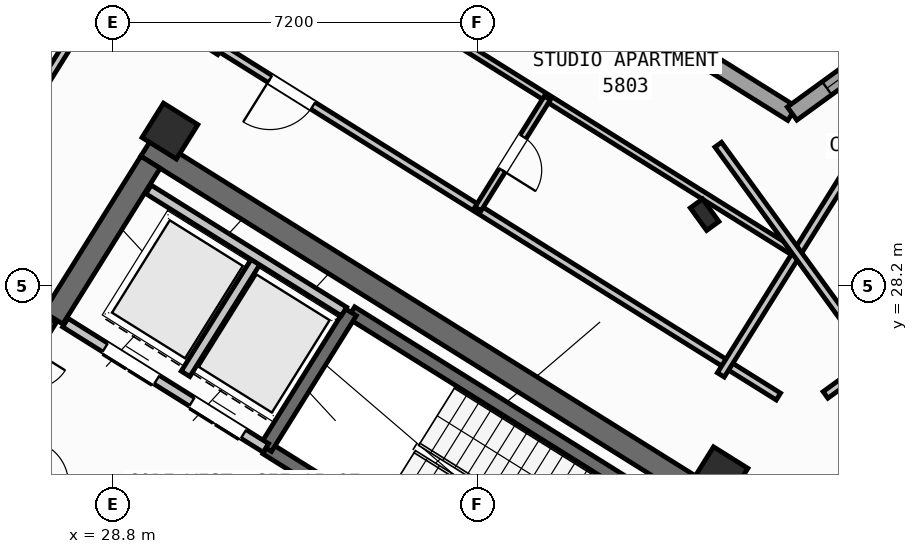
"""IFC4 building model, lengths in metres.
Left out: names, types, materials, properties, quantities, classifications, styles, units other than length and angle.
Written with IfcOpenShell. Run it as: python <this file> out.ifc"""

import sys

from ifc_helpers import new_model, si_unit, direction, frame, frame_2d, origin, origin_2d, place, context, subcontext, project, spatial, rectangle, hollow_rectangle, i_section, extrude, source, transform, mapped, element, fill, save


model = new_model("IFC4")
c1 = context("Model", 3, precision=1e-05, world=origin(), true_north=direction((0.0, 1.0)))
c2 = subcontext(c1, "Body", "Model", "MODEL_VIEW")
j1 = project(units=[si_unit("LENGTHUNIT", "METRE"), si_unit("PLANEANGLEUNIT", "RADIAN")], contexts=[c1])
p1 = place(None, origin())
s1 = spatial("IfcSite", under=j1, at=p1, CompositionType="ELEMENT")
p2 = place(p1, origin())
s2 = spatial("IfcBuilding", under=s1, at=p2, CompositionType="ELEMENT")
p3 = place(p2, frame((0.0, 0.0, 229.2)))
s3 = spatial("IfcBuildingStorey", under=s2, at=p3, CompositionType="ELEMENT", Elevation=229.2)
p4 = place(p3, frame((40.531, 24.036, 0.0), z_axis=(0.0, 0.0, 1.0), x_axis=(-0.848048787466, 0.529918157905, 0.0)))
e1 = element("IfcWall", 1, at=p4, inside=s3, PredefinedType="SHEAR", context=c2, shape_type="SweptSolid", body=[
    extrude(rectangle(XDim=13.04, YDim=0.45, at=frame_2d((6.52, 0.0))), origin(), (0.0, 0.0, 1.0), 4.22),
])
p5 = place(p3, frame((29.544, 30.636, 0.0), z_axis=(0.0, 0.0, 1.0), x_axis=(-0.529902075036, -0.848058836916, 0.0)))
e2 = element("IfcWall", 2, at=p5, inside=s3, PredefinedType="SHEAR", context=c2, shape_type="SweptSolid", body=[
    extrude(rectangle(XDim=3.625, YDim=0.45, at=frame_2d((1.812, 0.0))), origin(), (0.0, 0.0, 1.0), 4.22),
])
m1 = source(origin(), c2, "Body", "SweptSolid", [
    extrude(hollow_rectangle(XDim=0.8, YDim=0.8, WallThickness=0.032, at=origin_2d()), origin(), (0.0, 0.0, 1.0), 4.5),
])
for number, where, z_axis, x_axis in (
    (3, (40.783, 24.469, 0.0), (0.0, 0.0, 1.0), (-0.848, 0.53, 0.0)),
    (4, (29.928, 31.251, 0.0), (0.0, 0.0, 1.0), (-0.848, 0.53, 0.0)),
):
    element("IfcColumn", number, at=place(p3, frame(where, z_axis=z_axis, x_axis=x_axis)), inside=s3, PredefinedType="COLUMN", context=c2, shape_type="MappedRepresentation", body=[
        mapped(m1, transform((0.0, 0.0, 0.0), scale=1.0)),
    ])
m2 = source(origin(), c2, "Body", "SweptSolid", [
    extrude(i_section(OverallWidth=0.3, OverallDepth=0.55, WebThickness=0.015, FlangeThickness=0.029, at=origin_2d()), origin(), (0.0, 0.0, 1.0), 4.5),
])
p6 = place(p3, frame((40.479, 29.601, 0.0), z_axis=(0.0, 0.0, 1.0), x_axis=(0.809016994375, 0.587785252292, 0.0)))
e5 = element("IfcColumn", 5, at=p6, inside=s3, PredefinedType="COLUMN", context=c2, shape_type="MappedRepresentation", body=[
    mapped(m2, transform((0.0, 0.0, 0.0), scale=1.0)),
])
p7 = place(p3, frame((31.76, 12.183, 0.0), z_axis=(0.0, 0.0, 1.0), x_axis=(-0.848047074256, 0.529920899612, 0.0)))
e6 = element("IfcWall", 6, at=p7, inside=s3, PredefinedType="STANDARD", context=c2, shape_type="SweptSolid", body=[
    extrude(rectangle(XDim=30.652, YDim=0.32, at=frame_2d((15.326, 0.0))), origin(), (0.0, 0.0, 1.0), 4.22),
])
p8 = place(p7, frame((14.966, 0.0, 0.0)))
e7 = element("IfcOpeningElement", 7, at=p8, cuts=e6, PredefinedType="OPENING", context=c2, shape_type="SweptSolid", body=[
    extrude(rectangle(XDim=1.2, YDim=2.15, at=frame_2d((0.6, 1.075))), frame((0.0, 0.17, 0.0), z_axis=(0.0, -1.0, 0.0), x_axis=(1.0, 0.0, 0.0)), (0.0, 0.0, 1.0), 0.34),
])
p9 = place(p7, frame((2.096, 0.0, 0.9)))
e8 = element("IfcOpeningElement", 8, at=p9, cuts=e6, PredefinedType="OPENING", context=c2, shape_type="SweptSolid", body=[
    extrude(rectangle(XDim=1.65, YDim=1.45, at=frame_2d((0.825, 0.725))), frame((0.0, 0.17, 0.0), z_axis=(0.0, -1.0, 0.0), x_axis=(1.0, 0.0, 0.0)), (0.0, 0.0, 1.0), 0.34),
])
p10 = place(p7, frame((6.771, 0.0, 0.9)))
e9 = element("IfcOpeningElement", 9, at=p10, cuts=e6, PredefinedType="OPENING", context=c2, shape_type="SweptSolid", body=[
    extrude(rectangle(XDim=1.65, YDim=1.45, at=frame_2d((0.825, 0.725))), frame((0.0, 0.17, 0.0), z_axis=(0.0, -1.0, 0.0), x_axis=(1.0, 0.0, 0.0)), (0.0, 0.0, 1.0), 0.34),
])
p11 = place(p7, frame((20.283, 0.0, 0.95)))
e10 = element("IfcOpeningElement", 10, at=p11, cuts=e6, PredefinedType="OPENING", context=c2, shape_type="SweptSolid", body=[
    extrude(rectangle(XDim=1.95, YDim=1.35, at=frame_2d((0.975, 0.675))), frame((0.0, 0.17, 0.0), z_axis=(0.0, -1.0, 0.0), x_axis=(1.0, 0.0, 0.0)), (0.0, 0.0, 1.0), 0.34),
])
p12 = place(p7, frame((27.208, 0.0, 1.0)))
e11 = element("IfcOpeningElement", 11, at=p12, cuts=e6, PredefinedType="OPENING", context=c2, shape_type="SweptSolid", body=[
    extrude(rectangle(XDim=0.9, YDim=1.25, at=frame_2d((0.45, 0.625))), frame((0.0, 0.17, 0.0), z_axis=(0.0, -1.0, 0.0), x_axis=(1.0, 0.0, 0.0)), (0.0, 0.0, 1.0), 0.34),
])
p13 = place(p3, frame((17.424, 47.083, 0.0), z_axis=(0.0, 0.0, 1.0), x_axis=(0.848049927979, -0.529916332693, 0.0)))
e12 = element("IfcWall", 12, at=p13, inside=s3, PredefinedType="STANDARD", context=c2, shape_type="SweptSolid", body=[
    extrude(rectangle(XDim=29.223, YDim=0.32, at=frame_2d((14.612, 0.0))), origin(), (0.0, 0.0, 1.0), 4.22),
])
p14 = place(p13, frame((3.709, 0.0, 0.0)))
e13 = element("IfcOpeningElement", 13, at=p14, cuts=e12, PredefinedType="OPENING", context=c2, shape_type="SweptSolid", body=[
    extrude(rectangle(XDim=1.05, YDim=2.15, at=frame_2d((0.525, 1.075))), frame((0.0, 0.17, 0.0), z_axis=(0.0, -1.0, 0.0), x_axis=(1.0, 0.0, 0.0)), (0.0, 0.0, 1.0), 0.34),
])
p15 = place(p13, frame((0.809, 0.0, 1.0)))
e14 = element("IfcOpeningElement", 14, at=p15, cuts=e12, PredefinedType="OPENING", context=c2, shape_type="SweptSolid", body=[
    extrude(rectangle(XDim=0.9, YDim=1.25, at=frame_2d((0.45, 0.625))), frame((0.0, 0.17, 0.0), z_axis=(0.0, -1.0, 0.0), x_axis=(1.0, 0.0, 0.0)), (0.0, 0.0, 1.0), 0.34),
])
p16 = place(p13, frame((13.811, 0.0, 0.9)))
e15 = element("IfcOpeningElement", 15, at=p16, cuts=e12, PredefinedType="OPENING", context=c2, shape_type="SweptSolid", body=[
    extrude(rectangle(XDim=1.35, YDim=1.45, at=frame_2d((0.675, 0.725))), frame((0.0, 0.17, 0.0), z_axis=(0.0, -1.0, 0.0), x_axis=(1.0, 0.0, 0.0)), (0.0, 0.0, 1.0), 0.34),
])
p17 = place(p13, frame((17.254, 0.0, 1.0)))
e16 = element("IfcOpeningElement", 16, at=p17, cuts=e12, PredefinedType="OPENING", context=c2, shape_type="SweptSolid", body=[
    extrude(rectangle(XDim=0.9, YDim=1.25, at=frame_2d((0.45, 0.625))), frame((0.0, 0.17, 0.0), z_axis=(0.0, -1.0, 0.0), x_axis=(1.0, 0.0, 0.0)), (0.0, 0.0, 1.0), 0.34),
])
p18 = place(p13, frame((21.364, 0.0, 1.0)))
e17 = element("IfcOpeningElement", 17, at=p18, cuts=e12, PredefinedType="OPENING", context=c2, shape_type="SweptSolid", body=[
    extrude(rectangle(XDim=0.9, YDim=1.25, at=frame_2d((0.45, 0.625))), frame((0.0, 0.17, 0.0), z_axis=(0.0, -1.0, 0.0), x_axis=(1.0, 0.0, 0.0)), (0.0, 0.0, 1.0), 0.34),
])
p19 = place(p13, frame((26.003, 0.0, 1.0)))
e18 = element("IfcOpeningElement", 18, at=p19, cuts=e12, PredefinedType="OPENING", context=c2, shape_type="SweptSolid", body=[
    extrude(rectangle(XDim=0.9, YDim=1.25, at=frame_2d((0.45, 0.625))), frame((0.0, 0.17, 0.0), z_axis=(0.0, -1.0, 0.0), x_axis=(1.0, 0.0, 0.0)), (0.0, 0.0, 1.0), 0.34),
])
p20 = place(p13, frame((11.211, 0.0, 1.0)))
e19 = element("IfcOpeningElement", 19, at=p20, cuts=e12, PredefinedType="OPENING", context=c2, shape_type="SweptSolid", body=[
    extrude(rectangle(XDim=0.65, YDim=1.15, at=frame_2d((0.325, 0.575))), frame((0.0, 0.17, 0.0), z_axis=(0.0, -1.0, 0.0), x_axis=(1.0, 0.0, 0.0)), (0.0, 0.0, 1.0), 0.34),
])
p21 = place(p13, frame((9.079, 0.0, 1.0)))
e20 = element("IfcOpeningElement", 20, at=p21, cuts=e12, PredefinedType="OPENING", context=c2, shape_type="SweptSolid", body=[
    extrude(rectangle(XDim=0.65, YDim=1.15, at=frame_2d((0.325, 0.575))), frame((0.0, 0.17, 0.0), z_axis=(0.0, -1.0, 0.0), x_axis=(1.0, 0.0, 0.0)), (0.0, 0.0, 1.0), 0.34),
])
p22 = place(p13, frame((6.951, 0.0, 1.0)))
e21 = element("IfcOpeningElement", 21, at=p22, cuts=e12, PredefinedType="OPENING", context=c2, shape_type="SweptSolid", body=[
    extrude(rectangle(XDim=0.65, YDim=1.15, at=frame_2d((0.325, 0.575))), frame((0.0, 0.17, 0.0), z_axis=(0.0, -1.0, 0.0), x_axis=(1.0, 0.0, 0.0)), (0.0, 0.0, 1.0), 0.34),
])
p23 = place(p3, frame((42.207, 31.597, 0.0), z_axis=(0.0, 0.0, 1.0), x_axis=(0.809020333377, 0.587780656523, 0.0)))
e22 = element("IfcWall", 22, at=p23, inside=s3, PredefinedType="STANDARD", context=c2, shape_type="SweptSolid", body=[
    extrude(rectangle(XDim=15.223, YDim=0.32, at=frame_2d((7.611, 0.0))), origin(), (0.0, 0.0, 1.0), 4.22),
])
p24 = place(p23, frame((12.82, 0.0, 0.0)))
e23 = element("IfcOpeningElement", 23, at=p24, cuts=e22, PredefinedType="OPENING", context=c2, shape_type="SweptSolid", body=[
    extrude(rectangle(XDim=1.05, YDim=2.15, at=frame_2d((0.525, 1.075))), frame((0.0, 0.17, 0.0), z_axis=(0.0, -1.0, 0.0), x_axis=(1.0, 0.0, 0.0)), (0.0, 0.0, 1.0), 0.34),
])
p25 = place(p23, frame((0.85, 0.0, 0.9)))
e24 = element("IfcOpeningElement", 24, at=p25, cuts=e22, PredefinedType="OPENING", context=c2, shape_type="SweptSolid", body=[
    extrude(rectangle(XDim=1.65, YDim=1.45, at=frame_2d((0.825, 0.725))), frame((0.0, 0.17, 0.0), z_axis=(0.0, -1.0, 0.0), x_axis=(1.0, 0.0, 0.0)), (0.0, 0.0, 1.0), 0.34),
])
p26 = place(p23, frame((5.769, 0.0, 0.9)))
e25 = element("IfcOpeningElement", 25, at=p26, cuts=e22, PredefinedType="OPENING", context=c2, shape_type="SweptSolid", body=[
    extrude(rectangle(XDim=1.35, YDim=1.45, at=frame_2d((0.675, 0.725))), frame((0.0, 0.17, 0.0), z_axis=(0.0, -1.0, 0.0), x_axis=(1.0, 0.0, 0.0)), (0.0, 0.0, 1.0), 0.34),
])
p27 = place(p23, frame((10.219, 0.0, 1.0)))
e26 = element("IfcOpeningElement", 26, at=p27, cuts=e22, PredefinedType="OPENING", context=c2, shape_type="SweptSolid", body=[
    extrude(rectangle(XDim=0.9, YDim=1.25, at=frame_2d((0.45, 0.625))), frame((0.0, 0.17, 0.0), z_axis=(0.0, -1.0, 0.0), x_axis=(1.0, 0.0, 0.0)), (0.0, 0.0, 1.0), 0.34),
])
p28 = place(p3, frame((39.721, 23.788, 0.0), z_axis=(0.0, 0.0, 1.0), x_axis=(-0.848054434086, 0.529909121291, 0.0)))
e27 = element("IfcWall", 27, at=p28, inside=s3, PredefinedType="SHEAR", context=c2, shape_type="SweptSolid", body=[
    extrude(rectangle(XDim=7.33, YDim=0.26, at=frame_2d((3.665, 0.0))), origin(), (0.0, 0.0, 1.0), 4.22),
])
p29 = place(p3, frame((38.046, 21.108, 0.0), z_axis=(0.0, 0.0, 1.0), x_axis=(-0.848054434086, 0.529909121291, 0.0)))
e28 = element("IfcWall", 28, at=p29, inside=s3, PredefinedType="SHEAR", context=c2, shape_type="SweptSolid", body=[
    extrude(rectangle(XDim=7.33, YDim=0.26, at=frame_2d((3.665, 0.0))), origin(), (0.0, 0.0, 1.0), 4.22),
])
p30 = place(p29, frame((0.22, 0.0, 0.0)))
e29 = element("IfcOpeningElement", 29, at=p30, cuts=e28, PredefinedType="OPENING", context=c2, shape_type="SweptSolid", body=[
    extrude(rectangle(XDim=1.1, YDim=2.1, at=frame_2d((0.55, 1.05))), frame((0.0, 0.14, 0.0), z_axis=(0.0, -1.0, 0.0), x_axis=(1.0, 0.0, 0.0)), (0.0, 0.0, 1.0), 0.28),
])
p31 = place(p3, frame((33.496, 27.677, 0.0), z_axis=(0.0, 0.0, 1.0), x_axis=(-0.529908658664, -0.84805472316, 0.0)))
e30 = element("IfcWall", 30, at=p31, inside=s3, PredefinedType="SHEAR", context=c2, shape_type="SweptSolid", body=[
    extrude(rectangle(XDim=3.16, YDim=0.26, at=frame_2d((1.58, 0.0))), origin(), (0.0, 0.0, 1.0), 4.22),
])
p32 = place(p3, frame((31.822, 24.998, 0.0), z_axis=(0.0, 0.0, 1.0), x_axis=(-0.848054125777, 0.529909614701, 0.0)))
e31 = element("IfcWall", 31, at=p32, inside=s3, PredefinedType="STANDARD", context=c2, shape_type="SweptSolid", body=[
    extrude(rectangle(XDim=4.668, YDim=0.2, at=frame_2d((2.334, 0.0))), origin(), (0.0, 0.0, 1.0), 4.21),
])
p33 = place(p32, frame((0.52, 0.0, 0.0)))
e32 = element("IfcOpeningElement", 32, at=p33, cuts=e31, PredefinedType="OPENING", context=c2, shape_type="SweptSolid", body=[
    extrude(rectangle(XDim=1.2, YDim=2.15, at=frame_2d((0.6, 1.075))), frame((0.0, 0.11, 0.0), z_axis=(0.0, -1.0, 0.0), x_axis=(1.0, 0.0, 0.0)), (0.0, 0.0, 1.0), 0.22),
])
p34 = place(p32, frame((2.54, 0.0, 0.0)))
e33 = element("IfcOpeningElement", 33, at=p34, cuts=e31, PredefinedType="OPENING", context=c2, shape_type="SweptSolid", body=[
    extrude(rectangle(XDim=1.2, YDim=2.15, at=frame_2d((0.6, 1.075))), frame((0.0, 0.11, 0.0), z_axis=(0.0, -1.0, 0.0), x_axis=(1.0, 0.0, 0.0)), (0.0, 0.0, 1.0), 0.22),
])
p35 = place(p3, frame((31.645, 28.716, 0.0), z_axis=(0.0, 0.0, 1.0), x_axis=(-0.52986693015, -0.848080795876, 0.0)))
e34 = element("IfcWall", 34, at=p35, inside=s3, PredefinedType="STANDARD", context=c2, shape_type="SweptSolid", body=[
    extrude(rectangle(XDim=2.66, YDim=0.2, at=frame_2d((1.33, 0.0))), origin(), (0.0, 0.0, 1.0), 4.21),
])
p36 = place(p3, frame((33.363, 27.69, 0.0), z_axis=(0.0, 0.0, 1.0), x_axis=(-0.84804957148, 0.529916903215, 0.0)))
e35 = element("IfcWall", 35, at=p36, inside=s3, PredefinedType="STANDARD", context=c2, shape_type="SweptSolid", body=[
    extrude(rectangle(XDim=4.548, YDim=0.2, at=frame_2d((2.274, 0.0))), origin(), (0.0, 0.0, 1.0), 4.21),
])
p37 = place(p3, frame((31.525, 21.504, 0.0), z_axis=(0.0, 0.0, 1.0), x_axis=(-0.848042066329, 0.529928913853, 0.0)))
e36 = element("IfcWall", 36, at=p37, inside=s3, PredefinedType="STANDARD", context=c2, shape_type="SweptSolid", body=[
    extrude(rectangle(XDim=6.268, YDim=0.2, at=frame_2d((3.134, 0.0))), origin(), (0.0, 0.0, 1.0), 4.21),
])
p38 = place(p37, frame((4.4, 0.0, 0.0)))
e37 = element("IfcOpeningElement", 37, at=p38, cuts=e36, PredefinedType="OPENING", context=c2, shape_type="SweptSolid", body=[
    extrude(rectangle(XDim=0.86, YDim=2.05, at=frame_2d((0.43, 1.025))), frame((0.0, 0.11, 0.0), z_axis=(0.0, -1.0, 0.0), x_axis=(1.0, 0.0, 0.0)), (0.0, 0.0, 1.0), 0.22),
])
p39 = place(p37, frame((1.45, 0.0, 0.0)))
e38 = element("IfcOpeningElement", 38, at=p39, cuts=e36, PredefinedType="OPENING", context=c2, shape_type="SweptSolid", body=[
    extrude(rectangle(XDim=0.86, YDim=2.05, at=frame_2d((0.43, 1.025))), frame((0.0, 0.11, 0.0), z_axis=(0.0, -1.0, 0.0), x_axis=(1.0, 0.0, 0.0)), (0.0, 0.0, 1.0), 0.22),
])
p40 = place(p3, frame((27.596, 27.52, 0.0), z_axis=(0.0, 0.0, 1.0), x_axis=(-0.529865479138, -0.848081702443, 0.0)))
e39 = element("IfcWall", 39, at=p40, inside=s3, PredefinedType="STANDARD", context=c2, shape_type="SweptSolid", body=[
    extrude(rectangle(XDim=2.96, YDim=0.2, at=frame_2d((1.48, 0.0))), origin(), (0.0, 0.0, 1.0), 2.395),
])
p41 = place(p40, frame((0.7, 0.0, 0.0)))
e40 = element("IfcOpeningElement", 40, at=p41, cuts=e39, PredefinedType="OPENING", context=c2, shape_type="SweptSolid", body=[
    extrude(rectangle(XDim=1.5, YDim=2.15, at=frame_2d((0.75, 1.075))), frame((0.0, 0.11, 0.0), z_axis=(0.0, -1.0, 0.0), x_axis=(1.0, 0.0, 0.0)), (0.0, 0.0, 1.0), 0.22),
])
p42 = place(p3, frame((30.914, 32.829, 0.0), z_axis=(0.0, 0.0, 1.0), x_axis=(-0.848008813643, 0.529982124211, 0.0)))
e41 = element("IfcWall", 41, at=p42, inside=s3, PredefinedType="PARTITIONING", context=c2, shape_type="SweptSolid", body=[
    extrude(rectangle(XDim=2.61, YDim=0.16, at=frame_2d((1.305, 0.0))), origin(), (0.0, 0.0, 1.0), 4.21),
])
p43 = place(p3, frame((31.239, 38.274, 0.0), z_axis=(0.0, 0.0, 1.0), x_axis=(-0.529921796515, -0.848046513806, 0.0)))
e42 = element("IfcWall", 42, at=p43, inside=s3, PredefinedType="PARTITIONING", context=c2, shape_type="SweptSolid", body=[
    extrude(rectangle(XDim=16.5, YDim=0.16, at=frame_2d((8.25, 0.0))), origin(), (0.0, 0.0, 1.0), 4.21),
])
p44 = place(p3, frame((41.936, 26.012, 0.0), z_axis=(0.0, 0.0, 1.0), x_axis=(-0.848051154596, 0.529914369676, 0.0)))
e43 = element("IfcWall", 43, at=p44, inside=s3, PredefinedType="PARTITIONING", context=c2, shape_type="SweptSolid", body=[
    extrude(rectangle(XDim=15.57, YDim=0.16, at=frame_2d((7.785, 0.0))), origin(), (0.0, 0.0, 1.0), 4.21),
])
p45 = place(p44, frame((10.83, 0.0, 0.0)))
e44 = element("IfcOpeningElement", 44, at=p45, cuts=e43, PredefinedType="OPENING", context=c2, shape_type="SweptSolid", body=[
    extrude(rectangle(XDim=1.0, YDim=2.1, at=frame_2d((0.5, 1.05))), frame((0.0, 0.09, 0.0), z_axis=(0.0, -1.0, 0.0), x_axis=(1.0, 0.0, 0.0)), (0.0, 0.0, 1.0), 0.18),
])
p46 = place(p3, frame((43.704, 31.086, 0.0), z_axis=(0.0, 0.0, 1.0), x_axis=(-0.529906828443, -0.848055866774, 0.0)))
e45 = element("IfcWall", 45, at=p46, inside=s3, PredefinedType="PARTITIONING", context=c2, shape_type="SweptSolid", body=[
    extrude(rectangle(XDim=5.48, YDim=0.16, at=frame_2d((2.74, 0.0))), origin(), (0.0, 0.0, 1.0), 4.21),
])
p47 = place(p3, frame((42.226, 28.873, 0.0), z_axis=(0.0, 0.0, 1.0), x_axis=(-0.848049134363, 0.529917602752, 0.0)))
e46 = element("IfcWall", 46, at=p47, inside=s3, PredefinedType="PLUMBINGWALL", context=c2, shape_type="SweptSolid", body=[
    extrude(rectangle(XDim=14.3, YDim=0.14, at=frame_2d((7.15, 0.0))), origin(), (0.0, 0.0, 1.0), 4.21),
])
p48 = place(p47, frame((9.57, 0.0, 0.0)))
e47 = element("IfcOpeningElement", 47, at=p48, cuts=e46, PredefinedType="OPENING", context=c2, shape_type="SweptSolid", body=[
    extrude(rectangle(XDim=0.92, YDim=2.08, at=frame_2d((0.46, 1.04))), frame((0.0, 0.08, 0.0), z_axis=(0.0, -1.0, 0.0), x_axis=(1.0, 0.0, 0.0)), (0.0, 0.0, 1.0), 0.16),
])
p49 = place(p3, frame((37.375, 31.904, 0.0), z_axis=(0.0, 0.0, 1.0), x_axis=(-0.529913878929, -0.848051461244, 0.0)))
e48 = element("IfcWall", 48, at=p49, inside=s3, PredefinedType="PLUMBINGWALL", context=c2, shape_type="SweptSolid", body=[
    extrude(rectangle(XDim=2.58, YDim=0.14, at=frame_2d((1.29, 0.0))), origin(), (0.0, 0.0, 1.0), 4.21),
])
p50 = place(p49, frame((0.9, 0.0, 0.0)))
e49 = element("IfcOpeningElement", 49, at=p50, cuts=e48, PredefinedType="OPENING", context=c2, shape_type="SweptSolid", body=[
    extrude(rectangle(XDim=0.78, YDim=2.05, at=frame_2d((0.39, 1.025))), frame((0.0, 0.08, 0.0), z_axis=(0.0, -1.0, 0.0), x_axis=(1.0, 0.0, 0.0)), (0.0, 0.0, 1.0), 0.16),
])
p51 = place(p3, frame((42.866, 26.044, 0.0), z_axis=(0.0, 0.0, 1.0), x_axis=(0.809020254154, 0.587780765566, 0.0)))
e50 = element("IfcWall", 50, at=p51, inside=s3, PredefinedType="PARTITIONING", context=c2, shape_type="SweptSolid", body=[
    extrude(rectangle(XDim=14.67, YDim=0.16, at=frame_2d((7.335, 0.0))), origin(), (0.0, 0.0, 1.0), 4.21),
])
p52 = place(p51, frame((3.215, 0.0, 0.0)))
e51 = element("IfcOpeningElement", 51, at=p52, cuts=e50, PredefinedType="OPENING", context=c2, shape_type="SweptSolid", body=[
    extrude(rectangle(XDim=1.0, YDim=2.1, at=frame_2d((0.5, 1.05))), frame((0.0, 0.09, 0.0), z_axis=(0.0, -1.0, 0.0), x_axis=(1.0, 0.0, 0.0)), (0.0, 0.0, 1.0), 0.18),
])
p53 = place(p51, frame((9.915, 0.0, 0.0)))
e52 = element("IfcOpeningElement", 52, at=p53, cuts=e50, PredefinedType="OPENING", context=c2, shape_type="SweptSolid", body=[
    extrude(rectangle(XDim=1.0, YDim=2.1, at=frame_2d((0.5, 1.05))), frame((0.0, 0.09, 0.0), z_axis=(0.0, -1.0, 0.0), x_axis=(1.0, 0.0, 0.0)), (0.0, 0.0, 1.0), 0.18),
])
p54 = place(p3, frame((43.969, 26.55, 0.0), z_axis=(0.0, 0.0, 1.0), x_axis=(-0.587776919386, 0.80902304852, 0.0)))
e53 = element("IfcWall", 53, at=p54, inside=s3, PredefinedType="PARTITIONING", context=c2, shape_type="SweptSolid", body=[
    extrude(rectangle(XDim=5.48, YDim=0.16, at=frame_2d((2.74, 0.0))), origin(), (0.0, 0.0, 1.0), 4.21),
])
m3 = source(origin(), c2, "Body", "SweptSolid", [
    extrude(rectangle(XDim=0.9, YDim=1.25, at=frame_2d((0.45, 0.625))), frame((0.0, 0.03, 0.0), z_axis=(0.0, -1.0, 0.0), x_axis=(1.0, 0.0, 0.0)), (0.0, 0.0, 1.0), 0.06),
])
p55 = place(p19, origin())
e54 = element("IfcWindow", 54, at=p55, inside=s3, PartitioningType="SINGLE_PANEL", PredefinedType="WINDOW", context=c2, shape_type="MappedRepresentation", body=[
    mapped(m3, transform((0.0, 0.0, 0.0), scale=1.0)),
])
fill(e18, e54)
m4 = source(origin(), c2, "Body", "SweptSolid", [
    extrude(rectangle(XDim=1.65, YDim=1.45, at=frame_2d((0.825, 0.725))), frame((0.0, 0.03, 0.0), z_axis=(0.0, -1.0, 0.0), x_axis=(1.0, 0.0, 0.0)), (0.0, 0.0, 1.0), 0.06),
])
p56 = place(p25, origin())
e55 = element("IfcWindow", 55, at=p56, inside=s3, PartitioningType="SINGLE_PANEL", PredefinedType="WINDOW", context=c2, shape_type="MappedRepresentation", body=[
    mapped(m4, transform((0.0, 0.0, 0.0), scale=1.0)),
])
fill(e24, e55)
m5 = source(origin(), c2, "Body", "SweptSolid", [
    extrude(rectangle(XDim=1.2, YDim=2.15, at=frame_2d((0.6, 1.075))), frame((0.0, 0.025, 0.0), z_axis=(0.0, -1.0, 0.0), x_axis=(1.0, 0.0, 0.0)), (0.0, 0.0, 1.0), 0.05),
])
p57 = place(p33, origin())
e56 = element("IfcDoor", 56, at=p57, inside=s3, OperationType="DOUBLE_DOOR_SLIDING", PredefinedType="DOOR", context=c2, shape_type="MappedRepresentation", body=[
    mapped(m5, transform((0.0, 0.0, 0.0), scale=1.0)),
])
fill(e32, e56)
p58 = place(p34, origin())
e57 = element("IfcDoor", 57, at=p58, inside=s3, OperationType="DOUBLE_DOOR_SLIDING", PredefinedType="DOOR", context=c2, shape_type="MappedRepresentation", body=[
    mapped(m5, transform((0.0, 0.0, 0.0), scale=1.0)),
])
fill(e33, e57)
m6 = source(origin(), c2, "Body", "SweptSolid", [
    extrude(rectangle(XDim=1.0, YDim=2.1, at=frame_2d((0.5, 1.05))), frame((0.0, 0.025, 0.0), z_axis=(0.0, -1.0, 0.0), x_axis=(1.0, 0.0, 0.0)), (0.0, 0.0, 1.0), 0.05),
])
p59 = place(p45, origin())
e58 = element("IfcDoor", 58, at=p59, inside=s3, OperationType="SINGLE_SWING_RIGHT", PredefinedType="DOOR", context=c2, shape_type="MappedRepresentation", body=[
    mapped(m6, transform((0.0, 0.0, 0.0), scale=1.0)),
])
fill(e44, e58)
m7 = source(origin(), c2, "Body", "SweptSolid", [
    extrude(rectangle(XDim=0.78, YDim=2.05, at=frame_2d((0.39, 1.025))), frame((0.0, 0.025, 0.0), z_axis=(0.0, -1.0, 0.0), x_axis=(1.0, 0.0, 0.0)), (0.0, 0.0, 1.0), 0.05),
])
p60 = place(p50, origin())
e59 = element("IfcDoor", 59, at=p60, inside=s3, OperationType="SINGLE_SWING_RIGHT", PredefinedType="DOOR", context=c2, shape_type="MappedRepresentation", body=[
    mapped(m7, transform((0.0, 0.0, 0.0), scale=1.0)),
])
fill(e49, e59)
save(model, sys.argv[1])
